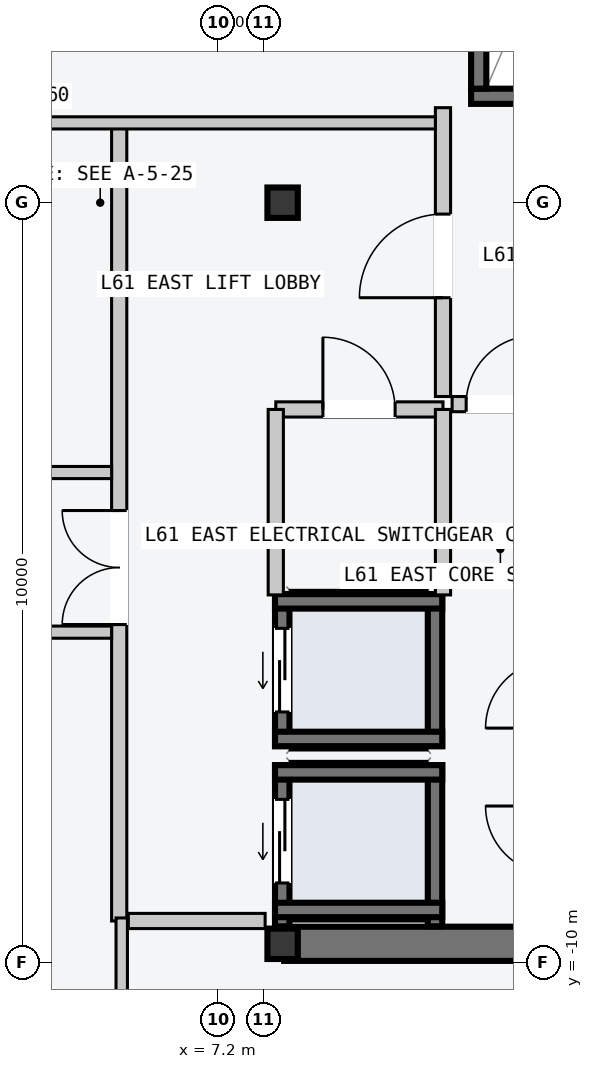
"""IFC4 building model, lengths in metres.
Left out: names, types, materials, properties, quantities, classifications, styles, units other than length and angle.
Written with IfcOpenShell. Run it as: python <this file> out.ifc"""

import sys

from ifc_helpers import new_model, si_unit, direction, frame, frame_2d, origin, origin_2d, place, context, subcontext, project, spatial, rectangle, i_section, extrude, element, fill, save


model = new_model("IFC4")
c1 = context("Model", 3, precision=1e-05, world=origin(), true_north=direction((0.0, 1.0)))
c2 = subcontext(c1, "Body", "Model", "MODEL_VIEW")
j1 = project(units=[si_unit("LENGTHUNIT", "METRE"), si_unit("PLANEANGLEUNIT", "RADIAN")], contexts=[c1])
p1 = place(None, origin())
s1 = spatial("IfcSite", under=j1, at=p1, CompositionType="ELEMENT")
p2 = place(p1, origin())
s2 = spatial("IfcBuilding", under=s1, at=p2, CompositionType="ELEMENT")
p3 = place(p2, frame((0.0, 0.0, 232.8)))
s3 = spatial("IfcBuildingStorey", under=s2, at=p3, CompositionType="ELEMENT", Elevation=232.8)
p4 = place(p3, frame((8.07, -9.75, -0.2), z_axis=(0.0, 0.0, 1.0), x_axis=(1.0, 0.0, 0.0)))
e1 = element("IfcWall", 1, at=p4, inside=s3, PredefinedType="SHEAR", context=c2, shape_type="SweptSolid", body=[
    extrude(rectangle(XDim=6.46, YDim=0.45, at=frame_2d((3.23, 0.0))), origin(), (0.0, 0.0, 1.0), 3.6),
])
p5 = place(p3, frame((10.53, 1.4, -0.2), z_axis=(0.0, 0.0, 1.0), x_axis=(1.0, 0.0, 0.0)))
e2 = element("IfcWall", 2, at=p5, inside=s3, PredefinedType="SOLIDWALL", context=c2, shape_type="SweptSolid", body=[
    extrude(rectangle(XDim=3.72, YDim=0.2, at=frame_2d((1.86, 0.0))), origin(), (0.0, 0.0, 1.0), 3.6),
])
p6 = place(p5, frame((1.5, 0.0, 0.2)))
e3 = element("IfcOpeningElement", 3, at=p6, cuts=e2, PredefinedType="OPENING", context=c2, shape_type="SweptSolid", body=[
    extrude(rectangle(XDim=1.12, YDim=2.18, at=frame_2d((0.56, 1.09))), frame((0.0, 0.11, 0.0), z_axis=(0.0, -1.0, 0.0), x_axis=(1.0, 0.0, 0.0)), (0.0, 0.0, 1.0), 0.22),
])
p7 = place(p3, frame((10.63, 1.5, -0.2), z_axis=(0.0, 0.0, 1.0), x_axis=(0.0, 1.0, 0.0)))
e4 = element("IfcWall", 4, at=p7, inside=s3, PredefinedType="SOLIDWALL", context=c2, shape_type="SweptSolid", body=[
    extrude(rectangle(XDim=7.8, YDim=0.2, at=frame_2d((3.9, 0.0))), origin(), (0.0, 0.0, 1.0), 3.6),
])
for number, where, z_axis, x_axis in (
    (5, (8.05, -9.75, 0.0), (0.0, 0.0, 1.0), (1.0, 0.0, 0.0)),
    (6, (8.05, 0.0, 0.0), (0.0, 0.0, 1.0), (1.0, 0.0, 0.0)),
):
    element("IfcColumn", number, at=place(p3, frame(where, z_axis=z_axis, x_axis=x_axis)), inside=s3, PredefinedType="COLUMN", context=c2, shape_type="SweptSolid", body=[
        extrude(i_section(OverallWidth=0.4, OverallDepth=0.4, WebThickness=0.013, FlangeThickness=0.021, at=origin_2d()), origin(), (0.0, 0.0, 1.0), 3.6),
    ])
p8 = place(p3, frame((8.045, -9.52, -0.2), z_axis=(0.0, 0.0, 1.0), x_axis=(0.0, 1.0, 0.0)))
e7 = element("IfcWall", 7, at=p8, inside=s3, PredefinedType="SOLIDWALL", context=c2, shape_type="SweptSolid", body=[
    extrude(rectangle(XDim=2.12, YDim=0.19, at=frame_2d((1.06, 0.0))), origin(), (0.0, 0.0, 1.0), 3.6),
])
p9 = place(p8, frame((0.57, 0.0, 0.2)))
e8 = element("IfcOpeningElement", 8, at=p9, cuts=e7, PredefinedType="OPENING", context=c2, shape_type="SweptSolid", body=[
    extrude(rectangle(XDim=1.1, YDim=2.2, at=frame_2d((0.55, 1.1))), frame((0.0, 0.105, 0.0), z_axis=(0.0, -1.0, 0.0), x_axis=(1.0, 0.0, 0.0)), (0.0, 0.0, 1.0), 0.21),
])
p10 = place(p3, frame((10.055, -9.52, -0.2), z_axis=(0.0, 0.0, 1.0), x_axis=(0.0, 1.0, 0.0)))
e9 = element("IfcWall", 9, at=p10, inside=s3, PredefinedType="SOLIDWALL", context=c2, shape_type="SweptSolid", body=[
    extrude(rectangle(XDim=2.12, YDim=0.19, at=frame_2d((1.06, 0.0))), origin(), (0.0, 0.0, 1.0), 3.6),
])
for number, where, z_axis, x_axis in (
    (10, (7.95, -7.495, -0.2), (0.0, 0.0, 1.0), (1.0, 0.0, 0.0)),
    (11, (7.95, -9.305, -0.2), (0.0, 0.0, 1.0), (1.0, 0.0, 0.0)),
):
    element("IfcWall", number, at=place(p3, frame(where, z_axis=z_axis, x_axis=x_axis)), inside=s3, PredefinedType="SOLIDWALL", context=c2, shape_type="SweptSolid", body=[
        extrude(rectangle(XDim=2.2, YDim=0.19, at=frame_2d((1.1, 0.0))), origin(), (0.0, 0.0, 1.0), 3.6),
    ])
p11 = place(p3, frame((8.045, -7.15, -0.2), z_axis=(0.0, 0.0, 1.0), x_axis=(0.0, 1.0, 0.0)))
e12 = element("IfcWall", 12, at=p11, inside=s3, PredefinedType="SOLIDWALL", context=c2, shape_type="SweptSolid", body=[
    extrude(rectangle(XDim=2.0, YDim=0.19, at=frame_2d((1.0, 0.0))), origin(), (0.0, 0.0, 1.0), 3.6),
])
p12 = place(p11, frame((0.45, 0.0, 0.2)))
e13 = element("IfcOpeningElement", 13, at=p12, cuts=e12, PredefinedType="OPENING", context=c2, shape_type="SweptSolid", body=[
    extrude(rectangle(XDim=1.1, YDim=2.2, at=frame_2d((0.55, 1.1))), frame((0.0, 0.105, 0.0), z_axis=(0.0, -1.0, 0.0), x_axis=(1.0, 0.0, 0.0)), (0.0, 0.0, 1.0), 0.21),
])
p13 = place(p3, frame((10.055, -7.15, -0.2), z_axis=(0.0, 0.0, 1.0), x_axis=(0.0, 1.0, 0.0)))
e14 = element("IfcWall", 14, at=p13, inside=s3, PredefinedType="SOLIDWALL", context=c2, shape_type="SweptSolid", body=[
    extrude(rectangle(XDim=2.0, YDim=0.19, at=frame_2d((1.0, 0.0))), origin(), (0.0, 0.0, 1.0), 3.6),
])
for number, where, z_axis, x_axis in (
    (15, (7.95, -5.245, -0.2), (0.0, 0.0, 1.0), (1.0, 0.0, 0.0)),
    (16, (7.95, -7.055, -0.2), (0.0, 0.0, 1.0), (1.0, 0.0, 0.0)),
):
    element("IfcWall", number, at=place(p3, frame(where, z_axis=z_axis, x_axis=x_axis)), inside=s3, PredefinedType="SOLIDWALL", context=c2, shape_type="SweptSolid", body=[
        extrude(rectangle(XDim=2.2, YDim=0.19, at=frame_2d((1.1, 0.0))), origin(), (0.0, 0.0, 1.0), 3.6),
    ])
p14 = place(p3, frame((5.9, -9.45, 0.0), z_axis=(0.0, 0.0, 1.0), x_axis=(0.0, 1.0, 0.0)))
e17 = element("IfcWall", 17, at=p14, inside=s3, PredefinedType="PARTITIONING", context=c2, shape_type="SweptSolid", body=[
    extrude(rectangle(XDim=10.5, YDim=0.2, at=frame_2d((5.25, 0.0))), origin(), (0.0, 0.0, 1.0), 3.4),
])
p15 = place(p14, frame((3.9, 0.0, 0.0)))
e18 = element("IfcOpeningElement", 18, at=p15, cuts=e17, PredefinedType="OPENING", context=c2, shape_type="SweptSolid", body=[
    extrude(rectangle(XDim=1.5, YDim=2.2, at=frame_2d((0.75, 1.1))), frame((0.0, 0.11, 0.0), z_axis=(0.0, -1.0, 0.0), x_axis=(1.0, 0.0, 0.0)), (0.0, 0.0, 1.0), 0.22),
])
p16 = place(p3, frame((6.02, -9.45, 0.0), z_axis=(0.0, 0.0, 1.0), x_axis=(1.0, 0.0, 0.0)))
e19 = element("IfcWall", 19, at=p16, inside=s3, PredefinedType="PARTITIONING", context=c2, shape_type="SweptSolid", body=[
    extrude(rectangle(XDim=1.8, YDim=0.2, at=frame_2d((0.9, 0.0))), origin(), (0.0, 0.0, 1.0), 3.4),
])
p17 = place(p3, frame((10.16, -2.55, 0.0), z_axis=(0.0, 0.0, 1.0), x_axis=(0.0, 1.0, 0.0)))
e20 = element("IfcWall", 20, at=p17, inside=s3, PredefinedType="PARTITIONING", context=c2, shape_type="SweptSolid", body=[
    extrude(rectangle(XDim=3.8, YDim=0.2, at=frame_2d((1.9, 0.0))), origin(), (0.0, 0.0, 1.0), 3.4),
])
p18 = place(p17, frame((1.3, 0.0, 0.0)))
e21 = element("IfcOpeningElement", 21, at=p18, cuts=e20, PredefinedType="OPENING", context=c2, shape_type="SweptSolid", body=[
    extrude(rectangle(XDim=1.1, YDim=2.15, at=frame_2d((0.55, 1.075))), frame((0.0, 0.11, 0.0), z_axis=(0.0, -1.0, 0.0), x_axis=(1.0, 0.0, 0.0)), (0.0, 0.0, 1.0), 0.22),
])
p19 = place(p3, frame((10.28, -2.65, 0.0), z_axis=(0.0, 0.0, 1.0), x_axis=(1.0, 0.0, 0.0)))
e22 = element("IfcWall", 22, at=p19, inside=s3, PredefinedType="PARTITIONING", context=c2, shape_type="SweptSolid", body=[
    extrude(rectangle(XDim=1.27, YDim=0.2, at=frame_2d((0.635, 0.0))), origin(), (0.0, 0.0, 1.0), 3.4),
])
p20 = place(p19, frame((0.185, 0.0, 0.0)))
e23 = element("IfcOpeningElement", 23, at=p20, cuts=e22, PredefinedType="OPENING", context=c2, shape_type="SweptSolid", body=[
    extrude(rectangle(XDim=0.9, YDim=2.15, at=frame_2d((0.45, 1.075))), frame((0.0, 0.11, 0.0), z_axis=(0.0, -1.0, 0.0), x_axis=(1.0, 0.0, 0.0)), (0.0, 0.0, 1.0), 0.22),
])
p21 = place(p3, frame((7.96, -2.72, 0.0), z_axis=(0.0, 0.0, 1.0), x_axis=(1.0, 0.0, 0.0)))
e24 = element("IfcWall", 24, at=p21, inside=s3, PredefinedType="PARTITIONING", context=c2, shape_type="SweptSolid", body=[
    extrude(rectangle(XDim=2.2, YDim=0.2, at=frame_2d((1.1, 0.0))), origin(), (0.0, 0.0, 1.0), 3.4),
])
p22 = place(p21, frame((0.62, 0.0, 0.0)))
e25 = element("IfcOpeningElement", 25, at=p22, cuts=e24, PredefinedType="OPENING", context=c2, shape_type="SweptSolid", body=[
    extrude(rectangle(XDim=0.95, YDim=2.1, at=frame_2d((0.475, 1.05))), frame((0.0, 0.11, 0.0), z_axis=(0.0, -1.0, 0.0), x_axis=(1.0, 0.0, 0.0)), (0.0, 0.0, 1.0), 0.22),
])
for number, where, z_axis, x_axis in (
    (26, (7.96, -5.16, 0.0), (0.0, 0.0, 1.0), (0.0, 1.0, 0.0)),
    (27, (10.16, -5.16, 0.0), (0.0, 0.0, 1.0), (0.0, 1.0, 0.0)),
):
    element("IfcWall", number, at=place(p3, frame(where, z_axis=z_axis, x_axis=x_axis)), inside=s3, PredefinedType="PARTITIONING", context=c2, shape_type="SweptSolid", body=[
        extrude(rectangle(XDim=2.44, YDim=0.2, at=frame_2d((1.22, 0.0))), origin(), (0.0, 0.0, 1.0), 3.4),
    ])
p23 = place(p3, frame((-0.49, 1.05, 0.0), z_axis=(0.0, 0.0, 1.0), x_axis=(1.0, 0.0, 0.0)))
e28 = element("IfcWall", 28, at=p23, inside=s3, PredefinedType="PARTITIONING", context=c2, shape_type="SweptSolid", body=[
    extrude(rectangle(XDim=10.55, YDim=0.16, at=frame_2d((5.275, 0.0))), origin(), (0.0, 0.0, 1.0), 3.4),
])
for number, where, z_axis, x_axis in (
    (29, (-0.49, -3.55, 0.0), (0.0, 0.0, 1.0), (1.0, 0.0, 0.0)),
    (30, (-0.49, -5.65, 0.0), (0.0, 0.0, 1.0), (1.0, 0.0, 0.0)),
):
    element("IfcWall", number, at=place(p3, frame(where, z_axis=z_axis, x_axis=x_axis)), inside=s3, PredefinedType="PARTITIONING", context=c2, shape_type="SweptSolid", body=[
        extrude(rectangle(XDim=6.29, YDim=0.16, at=frame_2d((3.145, 0.0))), origin(), (0.0, 0.0, 1.0), 3.4),
    ])
p24 = place(p3, frame((5.933, -17.56, 0.0), z_axis=(0.0, 0.0, 1.0), x_axis=(0.0, 1.0, 0.0)))
e31 = element("IfcWall", 31, at=p24, inside=s3, PredefinedType="PARTITIONING", context=c2, shape_type="SweptSolid", body=[
    extrude(rectangle(XDim=8.15, YDim=0.15, at=frame_2d((4.075, 0.0))), origin(), (0.0, 0.0, 1.0), 3.4),
])
p25 = place(p24, frame((1.05, 0.0, 0.0)))
e32 = element("IfcOpeningElement", 32, at=p25, cuts=e31, PredefinedType="OPENING", context=c2, shape_type="SweptSolid", body=[
    extrude(rectangle(XDim=0.96, YDim=2.18, at=frame_2d((0.48, 1.09))), frame((0.0, 0.085, 0.0), z_axis=(0.0, -1.0, 0.0), x_axis=(1.0, 0.0, 0.0)), (0.0, 0.0, 1.0), 0.17),
])
p26 = place(p9, origin())
e33 = element("IfcDoor", 33, at=p26, inside=s3, OperationType="SLIDING_TO_LEFT", PredefinedType="DOOR", context=c2, shape_type="SweptSolid", body=[
    extrude(rectangle(XDim=1.1, YDim=2.2, at=frame_2d((0.55, 1.1))), frame((0.0, 0.025, 0.0), z_axis=(0.0, -1.0, 0.0), x_axis=(1.0, 0.0, 0.0)), (0.0, 0.0, 1.0), 0.05),
])
fill(e8, e33)
p27 = place(p12, origin())
e34 = element("IfcDoor", 34, at=p27, inside=s3, OperationType="SLIDING_TO_LEFT", PredefinedType="DOOR", context=c2, shape_type="SweptSolid", body=[
    extrude(rectangle(XDim=1.1, YDim=2.2, at=frame_2d((0.55, 1.1))), frame((0.0, 0.025, 0.0), z_axis=(0.0, -1.0, 0.0), x_axis=(1.0, 0.0, 0.0)), (0.0, 0.0, 1.0), 0.05),
])
fill(e13, e34)
p28 = place(p15, origin())
e35 = element("IfcDoor", 35, at=p28, inside=s3, OperationType="DOUBLE_DOOR_SINGLE_SWING", PredefinedType="DOOR", context=c2, shape_type="SweptSolid", body=[
    extrude(rectangle(XDim=1.5, YDim=2.2, at=frame_2d((0.75, 1.1))), frame((0.0, 0.025, 0.0), z_axis=(0.0, -1.0, 0.0), x_axis=(1.0, 0.0, 0.0)), (0.0, 0.0, 1.0), 0.05),
])
fill(e18, e35)
p29 = place(p18, origin())
e36 = element("IfcDoor", 36, at=p29, inside=s3, OperationType="SINGLE_SWING_LEFT", PredefinedType="DOOR", context=c2, shape_type="SweptSolid", body=[
    extrude(rectangle(XDim=1.1, YDim=2.15, at=frame_2d((0.55, 1.075))), frame((0.0, 0.025, 0.0), z_axis=(0.0, -1.0, 0.0), x_axis=(1.0, 0.0, 0.0)), (0.0, 0.0, 1.0), 0.05),
])
fill(e21, e36)
p30 = place(p20, origin())
e37 = element("IfcDoor", 37, at=p30, inside=s3, OperationType="SINGLE_SWING_RIGHT", PredefinedType="DOOR", context=c2, shape_type="SweptSolid", body=[
    extrude(rectangle(XDim=0.9, YDim=2.15, at=frame_2d((0.45, 1.075))), frame((0.0, 0.025, 0.0), z_axis=(0.0, -1.0, 0.0), x_axis=(1.0, 0.0, 0.0)), (0.0, 0.0, 1.0), 0.05),
])
fill(e23, e37)
p31 = place(p22, origin())
e38 = element("IfcDoor", 38, at=p31, inside=s3, OperationType="SINGLE_SWING_LEFT", PredefinedType="DOOR", context=c2, shape_type="SweptSolid", body=[
    extrude(rectangle(XDim=0.95, YDim=2.1, at=frame_2d((0.475, 1.05))), frame((0.0, 0.025, 0.0), z_axis=(0.0, -1.0, 0.0), x_axis=(1.0, 0.0, 0.0)), (0.0, 0.0, 1.0), 0.05),
])
fill(e25, e38)
save(model, sys.argv[1])
